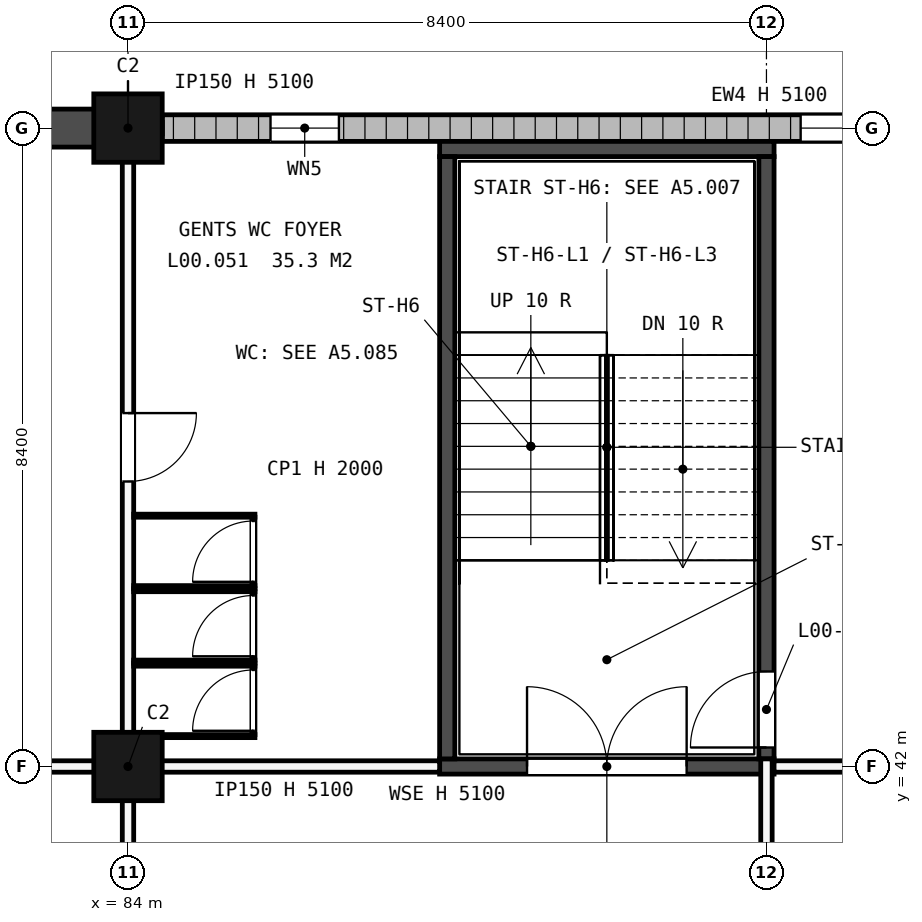
"""IFC4 building model, lengths in metres.
Left out: names, types, materials, properties, quantities, classifications, styles, units other than length and angle.
Written with IfcOpenShell. Run it as: python <this file> out.ifc"""

import sys

from ifc_helpers import new_model, si_unit, direction, frame, frame_2d, origin, origin_2d, place, context, subcontext, project, spatial, rectangle, extrude, element, fill, save


model = new_model("IFC4")
c1 = context("Model", 3, precision=1e-05, world=origin(), true_north=direction((0.0, 1.0)))
c2 = subcontext(c1, "Body", "Model", "MODEL_VIEW")
j1 = project(units=[si_unit("LENGTHUNIT", "METRE"), si_unit("PLANEANGLEUNIT", "RADIAN")], contexts=[c1])
p1 = place(None, origin())
s1 = spatial("IfcSite", under=j1, at=p1, CompositionType="ELEMENT")
p2 = place(p1, origin())
s2 = spatial("IfcBuilding", under=s1, at=p2, CompositionType="ELEMENT")
p3 = place(p2, origin())
s3 = spatial("IfcBuildingStorey", under=s2, at=p3, CompositionType="ELEMENT", Elevation=0.0)
for number, where, z_axis, x_axis in (
    (1, (84.0, 42.0, -0.3), (0.0, 0.0, 1.0), (1.0, 0.0, 0.0)),
    (2, (84.0, 50.4, -0.3), (0.0, 0.0, 1.0), (1.0, 0.0, 0.0)),
):
    element("IfcColumn", number, at=place(p3, frame(where, z_axis=z_axis, x_axis=x_axis)), inside=s3, PredefinedType="COLUMN", context=c2, shape_type="SweptSolid", body=[
        extrude(rectangle(XDim=0.9, YDim=0.9, at=origin_2d()), origin(), (0.0, 0.0, 1.0), 5.4),
    ])
p4 = place(p3, frame((42.0, 50.4, -0.3), z_axis=(0.0, 0.0, 1.0), x_axis=(1.0, 0.0, 0.0)))
e3 = element("IfcWall", 3, at=p4, inside=s3, PredefinedType="SHEAR", context=c2, shape_type="SweptSolid", body=[
    extrude(rectangle(XDim=42.0, YDim=0.5, at=frame_2d((21.0, 0.0))), origin(), (0.0, 0.0, 1.0), 5.4),
])
p5 = place(p4, frame((17.25, 0.0, 0.3)))
e4 = element("IfcOpeningElement", 4, at=p5, cuts=e3, PredefinedType="OPENING", context=c2, shape_type="SweptSolid", body=[
    extrude(rectangle(XDim=3.3, YDim=2.7, at=frame_2d((1.65, 1.35))), frame((0.0, 0.26, 0.0), z_axis=(0.0, -1.0, 0.0), x_axis=(1.0, 0.0, 0.0)), (0.0, 0.0, 1.0), 0.52),
])
p6 = place(p4, frame((21.45, 0.0, 0.3)))
e5 = element("IfcOpeningElement", 5, at=p6, cuts=e3, PredefinedType="OPENING", context=c2, shape_type="SweptSolid", body=[
    extrude(rectangle(XDim=3.3, YDim=2.7, at=frame_2d((1.65, 1.35))), frame((0.0, 0.26, 0.0), z_axis=(0.0, -1.0, 0.0), x_axis=(1.0, 0.0, 0.0)), (0.0, 0.0, 1.0), 0.52),
])
p7 = place(p3, frame((84.45, 50.4, 0.0), z_axis=(0.0, 0.0, 1.0), x_axis=(1.0, 0.0, 0.0)))
e6 = element("IfcWall", 6, at=p7, inside=s3, PredefinedType="STANDARD", context=c2, shape_type="SweptSolid", body=[
    extrude(rectangle(XDim=15.975, YDim=0.35, at=frame_2d((7.988, 0.0))), origin(), (0.0, 0.0, 1.0), 5.1),
])
p8 = place(p7, frame((11.1, 0.0, 0.0)))
e7 = element("IfcOpeningElement", 7, at=p8, cuts=e6, PredefinedType="OPENING", context=c2, shape_type="SweptSolid", body=[
    extrude(rectangle(XDim=2.1, YDim=2.2, at=frame_2d((1.05, 1.1))), frame((0.0, 0.185, 0.0), z_axis=(0.0, -1.0, 0.0), x_axis=(1.0, 0.0, 0.0)), (0.0, 0.0, 1.0), 0.37),
])
p9 = place(p7, frame((1.425, 0.0, 2.1)))
e8 = element("IfcOpeningElement", 8, at=p9, cuts=e6, PredefinedType="OPENING", context=c2, shape_type="SweptSolid", body=[
    extrude(rectangle(XDim=0.9, YDim=0.6, at=frame_2d((0.45, 0.3))), frame((0.0, 0.185, 0.0), z_axis=(0.0, -1.0, 0.0), x_axis=(1.0, 0.0, 0.0)), (0.0, 0.0, 1.0), 0.37),
])
p10 = place(p7, frame((8.4, 0.0, 0.9)))
e9 = element("IfcOpeningElement", 9, at=p10, cuts=e6, PredefinedType="OPENING", context=c2, shape_type="SweptSolid", body=[
    extrude(rectangle(XDim=1.8, YDim=1.5, at=frame_2d((0.9, 0.75))), frame((0.0, 0.185, 0.0), z_axis=(0.0, -1.0, 0.0), x_axis=(1.0, 0.0, 0.0)), (0.0, 0.0, 1.0), 0.37),
])
p11 = place(p7, frame((14.212, 0.0, 0.9)))
e10 = element("IfcOpeningElement", 10, at=p11, cuts=e6, PredefinedType="OPENING", context=c2, shape_type="SweptSolid", body=[
    extrude(rectangle(XDim=1.2, YDim=1.5, at=frame_2d((0.6, 0.75))), frame((0.0, 0.185, 0.0), z_axis=(0.0, -1.0, 0.0), x_axis=(1.0, 0.0, 0.0)), (0.0, 0.0, 1.0), 0.37),
])
p12 = place(p3, frame((88.1, 42.0, 0.0), z_axis=(0.0, 0.0, 1.0), x_axis=(1.0, 0.0, 0.0)))
e11 = element("IfcWall", 11, at=p12, inside=s3, PredefinedType="SHEAR", context=c2, shape_type="SweptSolid", body=[
    extrude(rectangle(XDim=4.4, YDim=0.2, at=frame_2d((2.2, 0.0))), origin(), (0.0, 0.0, 1.0), 5.1),
])
p13 = place(p12, frame((1.15, 0.0, 0.0)))
e12 = element("IfcOpeningElement", 12, at=p13, cuts=e11, PredefinedType="OPENING", context=c2, shape_type="SweptSolid", body=[
    extrude(rectangle(XDim=2.1, YDim=2.1, at=frame_2d((1.05, 1.05))), frame((0.0, 0.11, 0.0), z_axis=(0.0, -1.0, 0.0), x_axis=(1.0, 0.0, 0.0)), (0.0, 0.0, 1.0), 0.22),
])
p14 = place(p3, frame((88.1, 50.125, 0.0), z_axis=(0.0, 0.0, 1.0), x_axis=(1.0, 0.0, 0.0)))
e13 = element("IfcWall", 13, at=p14, inside=s3, PredefinedType="SHEAR", context=c2, shape_type="SweptSolid", body=[
    extrude(rectangle(XDim=4.4, YDim=0.2, at=frame_2d((2.2, 0.0))), origin(), (0.0, 0.0, 1.0), 5.1),
])
p15 = place(p3, frame((88.2, 42.1, 0.0), z_axis=(0.0, 0.0, 1.0), x_axis=(0.0, 1.0, 0.0)))
e14 = element("IfcWall", 14, at=p15, inside=s3, PredefinedType="SHEAR", context=c2, shape_type="SweptSolid", body=[
    extrude(rectangle(XDim=7.925, YDim=0.2, at=frame_2d((3.962, 0.0))), origin(), (0.0, 0.0, 1.0), 5.1),
])
p16 = place(p3, frame((92.4, 42.1, 0.0), z_axis=(0.0, 0.0, 1.0), x_axis=(0.0, 1.0, 0.0)))
e15 = element("IfcWall", 15, at=p16, inside=s3, PredefinedType="SHEAR", context=c2, shape_type="SweptSolid", body=[
    extrude(rectangle(XDim=7.925, YDim=0.2, at=frame_2d((3.962, 0.0))), origin(), (0.0, 0.0, 1.0), 5.1),
])
p17 = place(p16, frame((0.15, 0.0, 0.0)))
e16 = element("IfcOpeningElement", 16, at=p17, cuts=e15, PredefinedType="OPENING", context=c2, shape_type="SweptSolid", body=[
    extrude(rectangle(XDim=1.0, YDim=2.1, at=frame_2d((0.5, 1.05))), frame((0.0, 0.11, 0.0), z_axis=(0.0, -1.0, 0.0), x_axis=(1.0, 0.0, 0.0)), (0.0, 0.0, 1.0), 0.22),
])
p18 = place(p3, frame((50.68, 42.0, 0.0), z_axis=(0.0, 0.0, 1.0), x_axis=(1.0, 0.0, 0.0)))
e17 = element("IfcWall", 17, at=p18, inside=s3, PredefinedType="PARTITIONING", context=c2, shape_type="SweptSolid", body=[
    extrude(rectangle(XDim=33.32, YDim=0.15, at=frame_2d((16.66, 0.0))), origin(), (0.0, 0.0, 1.0), 4.45),
])
p19 = place(p18, frame((11.92, 0.0, 0.0)))
e18 = element("IfcOpeningElement", 18, at=p19, cuts=e17, PredefinedType="OPENING", context=c2, shape_type="SweptSolid", body=[
    extrude(rectangle(XDim=1.0, YDim=2.1, at=frame_2d((0.5, 1.05))), frame((0.0, 0.085, 0.0), z_axis=(0.0, -1.0, 0.0), x_axis=(1.0, 0.0, 0.0)), (0.0, 0.0, 1.0), 0.17),
])
p20 = place(p3, frame((84.0, 42.0, 0.0), z_axis=(0.0, 0.0, 1.0), x_axis=(1.0, 0.0, 0.0)))
e19 = element("IfcWall", 19, at=p20, inside=s3, PredefinedType="PARTITIONING", context=c2, shape_type="SweptSolid", body=[
    extrude(rectangle(XDim=4.1, YDim=0.15, at=frame_2d((2.05, 0.0))), origin(), (0.0, 0.0, 1.0), 5.1),
])
p21 = place(p3, frame((92.5, 42.0, 0.0), z_axis=(0.0, 0.0, 1.0), x_axis=(1.0, 0.0, 0.0)))
e20 = element("IfcWall", 20, at=p21, inside=s3, PredefinedType="PARTITIONING", context=c2, shape_type="SweptSolid", body=[
    extrude(rectangle(XDim=8.655, YDim=0.15, at=frame_2d((4.328, 0.0))), origin(), (0.0, 0.0, 1.0), 5.1),
])
p22 = place(p3, frame((84.0, 50.4, 0.0), z_axis=(0.0, 0.0, 1.0), x_axis=(1.0, 0.0, 0.0)))
e21 = element("IfcWall", 21, at=p22, inside=s3, PredefinedType="PARTITIONING", context=c2, shape_type="SweptSolid", body=[
    extrude(rectangle(XDim=0.45, YDim=0.15, at=frame_2d((0.225, 0.0))), origin(), (0.0, 0.0, 1.0), 5.1),
])
p23 = place(p3, frame((84.0, 37.875, 0.0), z_axis=(0.0, 0.0, 1.0), x_axis=(0.0, 1.0, 0.0)))
e22 = element("IfcWall", 22, at=p23, inside=s3, PredefinedType="PARTITIONING", context=c2, shape_type="SweptSolid", body=[
    extrude(rectangle(XDim=4.05, YDim=0.15, at=frame_2d((2.025, 0.0))), origin(), (0.0, 0.0, 1.0), 4.3),
])
p24 = place(p23, frame((1.325, 0.0, 0.0)))
e23 = element("IfcOpeningElement", 23, at=p24, cuts=e22, PredefinedType="OPENING", context=c2, shape_type="SweptSolid", body=[
    extrude(rectangle(XDim=1.0, YDim=2.1, at=frame_2d((0.5, 1.05))), frame((0.0, 0.085, 0.0), z_axis=(0.0, -1.0, 0.0), x_axis=(1.0, 0.0, 0.0)), (0.0, 0.0, 1.0), 0.17),
])
p25 = place(p3, frame((84.0, 42.075, 0.0), z_axis=(0.0, 0.0, 1.0), x_axis=(0.0, 1.0, 0.0)))
e24 = element("IfcWall", 24, at=p25, inside=s3, PredefinedType="PARTITIONING", context=c2, shape_type="SweptSolid", body=[
    extrude(rectangle(XDim=8.075, YDim=0.15, at=frame_2d((4.038, 0.0))), origin(), (0.0, 0.0, 1.0), 4.45),
])
p26 = place(p25, frame((3.675, 0.0, 0.0)))
e25 = element("IfcOpeningElement", 25, at=p26, cuts=e24, PredefinedType="OPENING", context=c2, shape_type="SweptSolid", body=[
    extrude(rectangle(XDim=0.9, YDim=2.1, at=frame_2d((0.45, 1.05))), frame((0.0, 0.085, 0.0), z_axis=(0.0, -1.0, 0.0), x_axis=(1.0, 0.0, 0.0)), (0.0, 0.0, 1.0), 0.17),
])
p27 = place(p3, frame((92.4, 33.245, 0.0), z_axis=(0.0, 0.0, 1.0), x_axis=(0.0, 1.0, 0.0)))
e26 = element("IfcWall", 26, at=p27, inside=s3, PredefinedType="PARTITIONING", context=c2, shape_type="SweptSolid", body=[
    extrude(rectangle(XDim=8.855, YDim=0.15, at=frame_2d((4.427, 0.0))), origin(), (0.0, 0.0, 1.0), 5.1),
])
for number, where, z_axis, x_axis in (
    (27, (84.075, 42.4, 0.0), (0.0, 0.0, 1.0), (1.0, 0.0, 0.0)),
    (28, (84.075, 43.34, 0.0), (0.0, 0.0, 1.0), (1.0, 0.0, 0.0)),
):
    element("IfcWall", number, at=place(p3, frame(where, z_axis=z_axis, x_axis=x_axis)), inside=s3, PredefinedType="PARTITIONING", context=c2, shape_type="SweptSolid", body=[
        extrude(rectangle(XDim=1.595, YDim=0.04, at=frame_2d((0.797, 0.0))), origin(), (0.0, 0.0, 1.0), 2.0),
    ])
p28 = place(p3, frame((85.65, 42.42, 0.0), z_axis=(0.0, 0.0, 1.0), x_axis=(0.0, 1.0, 0.0)))
e29 = element("IfcWall", 29, at=p28, inside=s3, PredefinedType="PARTITIONING", context=c2, shape_type="SweptSolid", body=[
    extrude(rectangle(XDim=0.9, YDim=0.04, at=frame_2d((0.45, 0.0))), origin(), (0.0, 0.0, 1.0), 2.0),
])
p29 = place(p28, frame((0.05, 0.0, 0.0)))
e30 = element("IfcOpeningElement", 30, at=p29, cuts=e29, PredefinedType="OPENING", context=c2, shape_type="SweptSolid", body=[
    extrude(rectangle(XDim=0.8, YDim=2.0, at=frame_2d((0.4, 1.0))), frame((0.0, 0.03, 0.0), z_axis=(0.0, -1.0, 0.0), x_axis=(1.0, 0.0, 0.0)), (0.0, 0.0, 1.0), 0.06),
])
for number, where, z_axis, x_axis in (
    (31, (84.075, 43.38, 0.0), (0.0, 0.0, 1.0), (1.0, 0.0, 0.0)),
    (32, (84.075, 44.32, 0.0), (0.0, 0.0, 1.0), (1.0, 0.0, 0.0)),
):
    element("IfcWall", number, at=place(p3, frame(where, z_axis=z_axis, x_axis=x_axis)), inside=s3, PredefinedType="PARTITIONING", context=c2, shape_type="SweptSolid", body=[
        extrude(rectangle(XDim=1.595, YDim=0.04, at=frame_2d((0.797, 0.0))), origin(), (0.0, 0.0, 1.0), 2.0),
    ])
p30 = place(p3, frame((85.65, 43.4, 0.0), z_axis=(0.0, 0.0, 1.0), x_axis=(0.0, 1.0, 0.0)))
e33 = element("IfcWall", 33, at=p30, inside=s3, PredefinedType="PARTITIONING", context=c2, shape_type="SweptSolid", body=[
    extrude(rectangle(XDim=0.9, YDim=0.04, at=frame_2d((0.45, 0.0))), origin(), (0.0, 0.0, 1.0), 2.0),
])
p31 = place(p30, frame((0.05, 0.0, 0.0)))
e34 = element("IfcOpeningElement", 34, at=p31, cuts=e33, PredefinedType="OPENING", context=c2, shape_type="SweptSolid", body=[
    extrude(rectangle(XDim=0.8, YDim=2.0, at=frame_2d((0.4, 1.0))), frame((0.0, 0.03, 0.0), z_axis=(0.0, -1.0, 0.0), x_axis=(1.0, 0.0, 0.0)), (0.0, 0.0, 1.0), 0.06),
])
for number, where, z_axis, x_axis in (
    (35, (84.075, 44.36, 0.0), (0.0, 0.0, 1.0), (1.0, 0.0, 0.0)),
    (36, (84.075, 45.3, 0.0), (0.0, 0.0, 1.0), (1.0, 0.0, 0.0)),
):
    element("IfcWall", number, at=place(p3, frame(where, z_axis=z_axis, x_axis=x_axis)), inside=s3, PredefinedType="PARTITIONING", context=c2, shape_type="SweptSolid", body=[
        extrude(rectangle(XDim=1.595, YDim=0.04, at=frame_2d((0.797, 0.0))), origin(), (0.0, 0.0, 1.0), 2.0),
    ])
p32 = place(p3, frame((85.65, 44.38, 0.0), z_axis=(0.0, 0.0, 1.0), x_axis=(0.0, 1.0, 0.0)))
e37 = element("IfcWall", 37, at=p32, inside=s3, PredefinedType="PARTITIONING", context=c2, shape_type="SweptSolid", body=[
    extrude(rectangle(XDim=0.9, YDim=0.04, at=frame_2d((0.45, 0.0))), origin(), (0.0, 0.0, 1.0), 2.0),
])
p33 = place(p32, frame((0.05, 0.0, 0.0)))
e38 = element("IfcOpeningElement", 38, at=p33, cuts=e37, PredefinedType="OPENING", context=c2, shape_type="SweptSolid", body=[
    extrude(rectangle(XDim=0.8, YDim=2.0, at=frame_2d((0.4, 1.0))), frame((0.0, 0.03, 0.0), z_axis=(0.0, -1.0, 0.0), x_axis=(1.0, 0.0, 0.0)), (0.0, 0.0, 1.0), 0.06),
])
p34 = place(p9, origin())
e39 = element("IfcWindow", 39, at=p34, inside=s3, PartitioningType="SINGLE_PANEL", PredefinedType="WINDOW", context=c2, shape_type="SweptSolid", body=[
    extrude(rectangle(XDim=0.9, YDim=0.6, at=frame_2d((0.45, 0.3))), frame((0.0, 0.03, 0.0), z_axis=(0.0, -1.0, 0.0), x_axis=(1.0, 0.0, 0.0)), (0.0, 0.0, 1.0), 0.06),
])
fill(e8, e39)
p35 = place(p10, origin())
e40 = element("IfcWindow", 40, at=p35, inside=s3, PartitioningType="SINGLE_PANEL", PredefinedType="WINDOW", context=c2, shape_type="SweptSolid", body=[
    extrude(rectangle(XDim=1.8, YDim=1.5, at=frame_2d((0.9, 0.75))), frame((0.0, 0.03, 0.0), z_axis=(0.0, -1.0, 0.0), x_axis=(1.0, 0.0, 0.0)), (0.0, 0.0, 1.0), 0.06),
])
fill(e9, e40)
p36 = place(p17, origin())
e41 = element("IfcDoor", 41, at=p36, inside=s3, OperationType="SINGLE_SWING_RIGHT", PredefinedType="DOOR", context=c2, shape_type="SweptSolid", body=[
    extrude(rectangle(XDim=1.0, YDim=2.1, at=frame_2d((0.5, 1.05))), frame((0.0, 0.025, 0.0), z_axis=(0.0, -1.0, 0.0), x_axis=(1.0, 0.0, 0.0)), (0.0, 0.0, 1.0), 0.05),
])
fill(e16, e41)
p37 = place(p13, origin())
e42 = element("IfcDoor", 42, at=p37, inside=s3, OperationType="DOUBLE_DOOR_SINGLE_SWING", PredefinedType="DOOR", context=c2, shape_type="SweptSolid", body=[
    extrude(rectangle(XDim=2.1, YDim=2.1, at=frame_2d((1.05, 1.05))), frame((0.0, 0.025, 0.0), z_axis=(0.0, -1.0, 0.0), x_axis=(1.0, 0.0, 0.0)), (0.0, 0.0, 1.0), 0.05),
])
fill(e12, e42)
p38 = place(p26, origin())
e43 = element("IfcDoor", 43, at=p38, inside=s3, OperationType="SINGLE_SWING_RIGHT", PredefinedType="DOOR", context=c2, shape_type="SweptSolid", body=[
    extrude(rectangle(XDim=0.9, YDim=2.1, at=frame_2d((0.45, 1.05))), frame((0.0, 0.025, 0.0), z_axis=(0.0, -1.0, 0.0), x_axis=(1.0, 0.0, 0.0)), (0.0, 0.0, 1.0), 0.05),
])
fill(e25, e43)
p39 = place(p29, origin())
e44 = element("IfcDoor", 44, at=p39, inside=s3, OperationType="SINGLE_SWING_LEFT", PredefinedType="DOOR", context=c2, shape_type="SweptSolid", body=[
    extrude(rectangle(XDim=0.8, YDim=2.0, at=frame_2d((0.4, 1.0))), frame((0.0, 0.02, 0.0), z_axis=(0.0, -1.0, 0.0), x_axis=(1.0, 0.0, 0.0)), (0.0, 0.0, 1.0), 0.04),
])
fill(e30, e44)
p40 = place(p31, origin())
e45 = element("IfcDoor", 45, at=p40, inside=s3, OperationType="SINGLE_SWING_LEFT", PredefinedType="DOOR", context=c2, shape_type="SweptSolid", body=[
    extrude(rectangle(XDim=0.8, YDim=2.0, at=frame_2d((0.4, 1.0))), frame((0.0, 0.02, 0.0), z_axis=(0.0, -1.0, 0.0), x_axis=(1.0, 0.0, 0.0)), (0.0, 0.0, 1.0), 0.04),
])
fill(e34, e45)
p41 = place(p33, origin())
e46 = element("IfcDoor", 46, at=p41, inside=s3, OperationType="SINGLE_SWING_LEFT", PredefinedType="DOOR", context=c2, shape_type="SweptSolid", body=[
    extrude(rectangle(XDim=0.8, YDim=2.0, at=frame_2d((0.4, 1.0))), frame((0.0, 0.02, 0.0), z_axis=(0.0, -1.0, 0.0), x_axis=(1.0, 0.0, 0.0)), (0.0, 0.0, 1.0), 0.04),
])
fill(e38, e46)
save(model, sys.argv[1])
